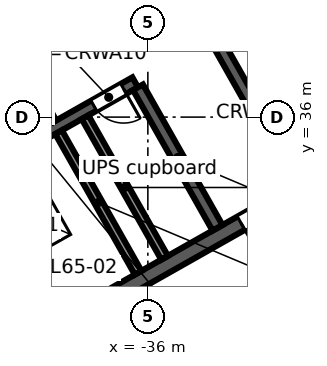
"""IFC4 building model, lengths in metres.
Left out: names, types, materials, properties, quantities, classifications, styles, units other than length and angle.
Written with IfcOpenShell. Run it as: python <this file> out.ifc"""

import sys

from ifc_helpers import new_model, si_unit, direction, frame, frame_2d, origin, place, context, subcontext, project, spatial, rectangle, extrude, element, fill, save


model = new_model("IFC4")
c1 = context("Model", 3, precision=1e-05, world=origin(), true_north=direction((0.0, 1.0)))
c2 = subcontext(c1, "Body", "Model", "MODEL_VIEW")
j1 = project(units=[si_unit("LENGTHUNIT", "METRE"), si_unit("PLANEANGLEUNIT", "RADIAN")], contexts=[c1])
p1 = place(None, origin())
s1 = spatial("IfcSite", under=j1, at=p1, CompositionType="ELEMENT")
p2 = place(p1, origin())
s2 = spatial("IfcBuilding", under=s1, at=p2, CompositionType="ELEMENT")
p3 = place(p2, frame((0.0, 0.0, 293.1)))
s3 = spatial("IfcBuildingStorey", under=s2, at=p3, CompositionType="ELEMENT", Elevation=293.1)
p4 = place(p3, frame((-3.017, 46.293, 0.0), z_axis=(0.0, 0.0, 1.0), x_axis=(-0.870355474887, -0.492423950812, 0.0)))
e1 = element("IfcWall", 1, at=p4, inside=s3, PredefinedType="STANDARD", context=c2, shape_type="SweptSolid", body=[
    extrude(rectangle(XDim=40.34, YDim=0.25, at=frame_2d((20.17, 0.0))), origin(), (0.0, 0.0, 1.0), 3.52),
])
p5 = place(p4, frame((37.428, 0.0, 0.8)))
e2 = element("IfcOpeningElement", 2, at=p5, cuts=e1, PredefinedType="OPENING", context=c2, shape_type="SweptSolid", body=[
    extrude(rectangle(XDim=2.4, YDim=2.2, at=frame_2d((1.2, 1.1))), frame((0.0, 0.135, 0.0), z_axis=(0.0, -1.0, 0.0), x_axis=(1.0, 0.0, 0.0)), (0.0, 0.0, 1.0), 0.27),
])
p6 = place(p4, frame((34.372, 0.0, 0.0)))
e3 = element("IfcOpeningElement", 3, at=p6, cuts=e1, PredefinedType="OPENING", context=c2, shape_type="SweptSolid", body=[
    extrude(rectangle(XDim=1.8, YDim=2.4, at=frame_2d((0.9, 1.2))), frame((0.0, 0.135, 0.0), z_axis=(0.0, -1.0, 0.0), x_axis=(1.0, 0.0, 0.0)), (0.0, 0.0, 1.0), 0.27),
])
p7 = place(p4, frame((30.716, 0.0, 0.8)))
e4 = element("IfcOpeningElement", 4, at=p7, cuts=e1, PredefinedType="OPENING", context=c2, shape_type="SweptSolid", body=[
    extrude(rectangle(XDim=2.4, YDim=2.2, at=frame_2d((1.2, 1.1))), frame((0.0, 0.135, 0.0), z_axis=(0.0, -1.0, 0.0), x_axis=(1.0, 0.0, 0.0)), (0.0, 0.0, 1.0), 0.27),
])
p8 = place(p4, frame((27.36, 0.0, 0.8)))
e5 = element("IfcOpeningElement", 5, at=p8, cuts=e1, PredefinedType="OPENING", context=c2, shape_type="SweptSolid", body=[
    extrude(rectangle(XDim=2.4, YDim=2.2, at=frame_2d((1.2, 1.1))), frame((0.0, 0.135, 0.0), z_axis=(0.0, -1.0, 0.0), x_axis=(1.0, 0.0, 0.0)), (0.0, 0.0, 1.0), 0.27),
])
p9 = place(p4, frame((24.304, 0.0, 0.0)))
e6 = element("IfcOpeningElement", 6, at=p9, cuts=e1, PredefinedType="OPENING", context=c2, shape_type="SweptSolid", body=[
    extrude(rectangle(XDim=1.8, YDim=2.4, at=frame_2d((0.9, 1.2))), frame((0.0, 0.135, 0.0), z_axis=(0.0, -1.0, 0.0), x_axis=(1.0, 0.0, 0.0)), (0.0, 0.0, 1.0), 0.27),
])
p10 = place(p4, frame((20.648, 0.0, 0.8)))
e7 = element("IfcOpeningElement", 7, at=p10, cuts=e1, PredefinedType="OPENING", context=c2, shape_type="SweptSolid", body=[
    extrude(rectangle(XDim=2.4, YDim=2.2, at=frame_2d((1.2, 1.1))), frame((0.0, 0.135, 0.0), z_axis=(0.0, -1.0, 0.0), x_axis=(1.0, 0.0, 0.0)), (0.0, 0.0, 1.0), 0.27),
])
p11 = place(p4, frame((17.292, 0.0, 0.8)))
e8 = element("IfcOpeningElement", 8, at=p11, cuts=e1, PredefinedType="OPENING", context=c2, shape_type="SweptSolid", body=[
    extrude(rectangle(XDim=2.4, YDim=2.2, at=frame_2d((1.2, 1.1))), frame((0.0, 0.135, 0.0), z_axis=(0.0, -1.0, 0.0), x_axis=(1.0, 0.0, 0.0)), (0.0, 0.0, 1.0), 0.27),
])
p12 = place(p4, frame((14.236, 0.0, 0.0)))
e9 = element("IfcOpeningElement", 9, at=p12, cuts=e1, PredefinedType="OPENING", context=c2, shape_type="SweptSolid", body=[
    extrude(rectangle(XDim=1.8, YDim=2.4, at=frame_2d((0.9, 1.2))), frame((0.0, 0.135, 0.0), z_axis=(0.0, -1.0, 0.0), x_axis=(1.0, 0.0, 0.0)), (0.0, 0.0, 1.0), 0.27),
])
p13 = place(p4, frame((10.58, 0.0, 0.8)))
e10 = element("IfcOpeningElement", 10, at=p13, cuts=e1, PredefinedType="OPENING", context=c2, shape_type="SweptSolid", body=[
    extrude(rectangle(XDim=2.4, YDim=2.2, at=frame_2d((1.2, 1.1))), frame((0.0, 0.135, 0.0), z_axis=(0.0, -1.0, 0.0), x_axis=(1.0, 0.0, 0.0)), (0.0, 0.0, 1.0), 0.27),
])
p14 = place(p4, frame((7.224, 0.0, 0.8)))
e11 = element("IfcOpeningElement", 11, at=p14, cuts=e1, PredefinedType="OPENING", context=c2, shape_type="SweptSolid", body=[
    extrude(rectangle(XDim=2.4, YDim=2.2, at=frame_2d((1.2, 1.1))), frame((0.0, 0.135, 0.0), z_axis=(0.0, -1.0, 0.0), x_axis=(1.0, 0.0, 0.0)), (0.0, 0.0, 1.0), 0.27),
])
p15 = place(p4, frame((4.168, 0.0, 0.0)))
e12 = element("IfcOpeningElement", 12, at=p15, cuts=e1, PredefinedType="OPENING", context=c2, shape_type="SweptSolid", body=[
    extrude(rectangle(XDim=1.8, YDim=2.4, at=frame_2d((0.9, 1.2))), frame((0.0, 0.135, 0.0), z_axis=(0.0, -1.0, 0.0), x_axis=(1.0, 0.0, 0.0)), (0.0, 0.0, 1.0), 0.27),
])
p16 = place(p4, frame((0.512, 0.0, 0.8)))
e13 = element("IfcOpeningElement", 13, at=p16, cuts=e1, PredefinedType="OPENING", context=c2, shape_type="SweptSolid", body=[
    extrude(rectangle(XDim=2.4, YDim=2.2, at=frame_2d((1.2, 1.1))), frame((0.0, 0.135, 0.0), z_axis=(0.0, -1.0, 0.0), x_axis=(1.0, 0.0, 0.0)), (0.0, 0.0, 1.0), 0.27),
])
p17 = place(p3, frame((-39.813, 29.662, 0.0), z_axis=(0.0, 0.0, 1.0), x_axis=(0.870350116061, 0.492433422375, 0.0)))
e14 = element("IfcWall", 14, at=p17, inside=s3, PredefinedType="SOLIDWALL", context=c2, shape_type="SweptSolid", body=[
    extrude(rectangle(XDim=17.0, YDim=0.4, at=frame_2d((8.5, 0.0))), origin(), (0.0, 0.0, 1.0), 3.52),
])
p18 = place(p17, frame((7.2, 0.0, 0.0)))
e15 = element("IfcOpeningElement", 15, at=p18, cuts=e14, PredefinedType="OPENING", context=c2, shape_type="SweptSolid", body=[
    extrude(rectangle(XDim=1.2, YDim=2.1, at=frame_2d((0.6, 1.05))), frame((0.0, 0.21, 0.0), z_axis=(0.0, -1.0, 0.0), x_axis=(1.0, 0.0, 0.0)), (0.0, 0.0, 1.0), 0.42),
])
p19 = place(p3, frame((-41.73, 33.863, 0.0), z_axis=(0.0, 0.0, 1.0), x_axis=(0.870350800578, 0.492432212525, 0.0)))
e16 = element("IfcWall", 16, at=p19, inside=s3, PredefinedType="SOLIDWALL", context=c2, shape_type="SweptSolid", body=[
    extrude(rectangle(XDim=6.2, YDim=0.3, at=frame_2d((3.1, 0.0))), origin(), (0.0, 0.0, 1.0), 3.52),
])
p20 = place(p19, frame((1.3, 0.0, 0.0)))
e17 = element("IfcOpeningElement", 17, at=p20, cuts=e16, PredefinedType="OPENING", context=c2, shape_type="SweptSolid", body=[
    extrude(rectangle(XDim=1.1, YDim=2.1, at=frame_2d((0.55, 1.05))), frame((0.0, 0.16, 0.0), z_axis=(0.0, -1.0, 0.0), x_axis=(1.0, 0.0, 0.0)), (0.0, 0.0, 1.0), 0.32),
])
p21 = place(p19, frame((4.95, 0.0, 0.0)))
e18 = element("IfcOpeningElement", 18, at=p21, cuts=e16, PredefinedType="OPENING", context=c2, shape_type="SweptSolid", body=[
    extrude(rectangle(XDim=0.9, YDim=2.1, at=frame_2d((0.45, 1.05))), frame((0.0, 0.16, 0.0), z_axis=(0.0, -1.0, 0.0), x_axis=(1.0, 0.0, 0.0)), (0.0, 0.0, 1.0), 0.32),
])
p22 = place(p3, frame((-43.897, 37.692, 0.0), z_axis=(0.0, 0.0, 1.0), x_axis=(0.870356351998, 0.492422400523, 0.0)))
e19 = element("IfcWall", 19, at=p22, inside=s3, PredefinedType="SOLIDWALL", context=c2, shape_type="SweptSolid", body=[
    extrude(rectangle(XDim=7.6, YDim=0.3, at=frame_2d((3.8, 0.0))), origin(), (0.0, 0.0, 1.0), 3.52),
])
p23 = place(p22, frame((0.4, 0.0, 0.0)))
e20 = element("IfcOpeningElement", 20, at=p23, cuts=e19, PredefinedType="OPENING", context=c2, shape_type="SweptSolid", body=[
    extrude(rectangle(XDim=1.0, YDim=2.1, at=frame_2d((0.5, 1.05))), frame((0.0, 0.16, 0.0), z_axis=(0.0, -1.0, 0.0), x_axis=(1.0, 0.0, 0.0)), (0.0, 0.0, 1.0), 0.32),
])
p24 = place(p3, frame((-38.349, 35.603, 0.0), z_axis=(0.0, 0.0, 1.0), x_axis=(0.492397924348, -0.870370199454, 0.0)))
e21 = element("IfcWall", 21, at=p24, inside=s3, PredefinedType="SOLIDWALL", context=c2, shape_type="SweptSolid", body=[
    extrude(rectangle(XDim=4.25, YDim=0.2, at=frame_2d((2.125, 0.0))), origin(), (0.0, 0.0, 1.0), 3.52),
])
p25 = place(p3, frame((-40.516, 39.433, 0.0), z_axis=(0.0, 0.0, 1.0), x_axis=(0.492453559952, -0.87033872216, 0.0)))
e22 = element("IfcWall", 22, at=p25, inside=s3, PredefinedType="PARTITIONING", context=c2, shape_type="SweptSolid", body=[
    extrude(rectangle(XDim=4.1, YDim=0.2, at=frame_2d((2.05, 0.0))), origin(), (0.0, 0.0, 1.0), 3.52),
])
p26 = place(p25, frame((1.55, 0.0, 0.0)))
e23 = element("IfcOpeningElement", 23, at=p26, cuts=e22, PredefinedType="OPENING", context=c2, shape_type="SweptSolid", body=[
    extrude(rectangle(XDim=1.0, YDim=2.1, at=frame_2d((0.5, 1.05))), frame((0.0, 0.11, 0.0), z_axis=(0.0, -1.0, 0.0), x_axis=(1.0, 0.0, 0.0)), (0.0, 0.0, 1.0), 0.22),
])
p27 = place(p3, frame((-37.653, 35.997, 0.0), z_axis=(0.0, 0.0, 1.0), x_axis=(0.492422543467, -0.870356271124, 0.0)))
e24 = element("IfcWall", 24, at=p27, inside=s3, PredefinedType="SOLIDWALL", context=c2, shape_type="SweptSolid", body=[
    extrude(rectangle(XDim=4.25, YDim=0.2, at=frame_2d((2.125, 0.0))), origin(), (0.0, 0.0, 1.0), 3.52),
])
for number, where, z_axis, x_axis in (
    (25, (-36.26, 36.785, 0.0), (0.0, 0.0, 1.0), (0.492, -0.87, 0.0)),
    (26, (-34.171, 37.967, 0.0), (0.0, 0.0, 1.0), (0.492, -0.87, 0.0)),
):
    element("IfcWall", number, at=place(p3, frame(where, z_axis=z_axis, x_axis=x_axis)), inside=s3, PredefinedType="SOLIDWALL", context=c2, shape_type="SweptSolid", body=[
        extrude(rectangle(XDim=4.25, YDim=0.3, at=frame_2d((2.125, 0.0))), origin(), (0.0, 0.0, 1.0), 3.52),
    ])
p28 = place(p18, frame((1.2, 0.0, 0.0), z_axis=(0.0, 0.0, 1.0), x_axis=(-1.0, 0.0, 0.0)))
e27 = element("IfcDoor", 27, at=p28, inside=s3, OperationType="SINGLE_SWING_RIGHT", PredefinedType="DOOR", context=c2, shape_type="SweptSolid", body=[
    extrude(rectangle(XDim=1.2, YDim=2.1, at=frame_2d((0.6, 1.05))), frame((0.0, 0.025, 0.0), z_axis=(0.0, -1.0, 0.0), x_axis=(1.0, 0.0, 0.0)), (0.0, 0.0, 1.0), 0.05),
])
fill(e15, e27)
p29 = place(p21, frame((0.9, 0.0, 0.0), z_axis=(0.0, 0.0, 1.0), x_axis=(-1.0, 0.0, 0.0)))
e28 = element("IfcDoor", 28, at=p29, inside=s3, OperationType="SINGLE_SWING_LEFT", PredefinedType="DOOR", context=c2, shape_type="SweptSolid", body=[
    extrude(rectangle(XDim=0.9, YDim=2.1, at=frame_2d((0.45, 1.05))), frame((0.0, 0.025, 0.0), z_axis=(0.0, -1.0, 0.0), x_axis=(1.0, 0.0, 0.0)), (0.0, 0.0, 1.0), 0.05),
])
fill(e18, e28)
save(model, sys.argv[1])
